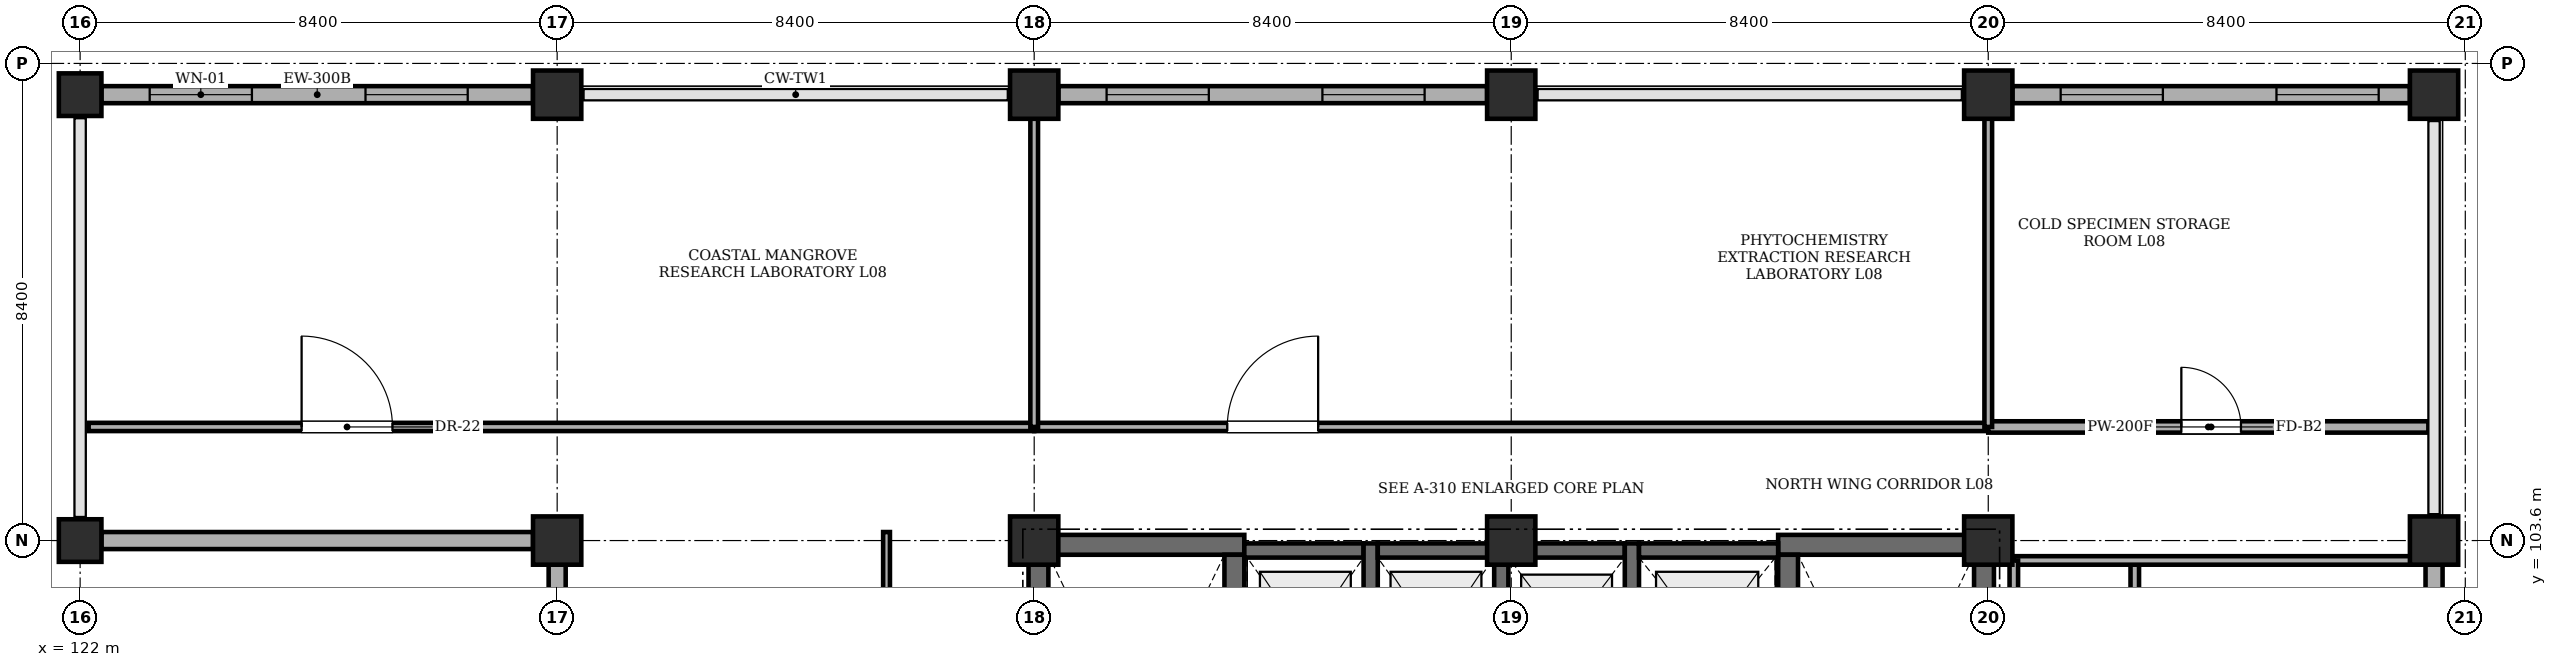
"""IFC4 building model, lengths in metres.
Left out: names, types, materials, properties, quantities, classifications, styles, units other than length and angle.
Written with IfcOpenShell. Run it as: python <this file> out.ifc"""

import sys

from ifc_helpers import new_model, si_unit, direction, frame, frame_2d, origin, origin_2d, place, context, subcontext, project, spatial, rectangle, extrude, element, fill, save


model = new_model("IFC4")
c1 = context("Model", 3, precision=1e-05, world=origin(), true_north=direction((0.0, 1.0)))
c2 = subcontext(c1, "Body", "Model", "MODEL_VIEW")
j1 = project(units=[si_unit("LENGTHUNIT", "METRE"), si_unit("PLANEANGLEUNIT", "RADIAN")], contexts=[c1])
p1 = place(None, origin())
s1 = spatial("IfcSite", under=j1, at=p1, CompositionType="ELEMENT")
p2 = place(p1, origin())
s2 = spatial("IfcBuilding", under=s1, at=p2, CompositionType="ELEMENT")
p3 = place(p2, frame((0.0, 0.0, 31.8)))
s3 = spatial("IfcBuildingStorey", under=s2, at=p3, CompositionType="ELEMENT", Elevation=31.8)
for number, where, z_axis, x_axis in (
    (1, (122.0, 103.6, 0.0), (0.0, 0.0, 1.0), (1.0, 0.0, 0.0)),
    (2, (122.0, 111.45, 0.0), (0.0, 0.0, 1.0), (1.0, 0.0, 0.0)),
):
    element("IfcColumn", number, at=place(p3, frame(where, z_axis=z_axis, x_axis=x_axis)), inside=s3, PredefinedType="COLUMN", context=c2, shape_type="SweptSolid", body=[
        extrude(rectangle(XDim=0.75, YDim=0.75, at=origin_2d()), origin(), (0.0, 0.0, 1.0), 4.02),
    ])
for number, where, z_axis, x_axis in (
    (3, (130.4, 103.6, 0.0), (0.0, 0.0, 1.0), (1.0, 0.0, 0.0)),
    (4, (130.4, 111.45, 0.0), (0.0, 0.0, 1.0), (1.0, 0.0, 0.0)),
    (5, (138.8, 103.6, 0.0), (0.0, 0.0, 1.0), (1.0, 0.0, 0.0)),
    (6, (138.8, 111.45, 0.0), (0.0, 0.0, 1.0), (1.0, 0.0, 0.0)),
    (7, (147.2, 103.6, 0.0), (0.0, 0.0, 1.0), (1.0, 0.0, 0.0)),
    (8, (147.2, 111.45, 0.0), (0.0, 0.0, 1.0), (1.0, 0.0, 0.0)),
    (9, (155.6, 103.6, 0.0), (0.0, 0.0, 1.0), (1.0, 0.0, 0.0)),
    (10, (155.6, 111.45, 0.0), (0.0, 0.0, 1.0), (1.0, 0.0, 0.0)),
    (11, (163.45, 103.6, 0.0), (0.0, 0.0, 1.0), (1.0, 0.0, 0.0)),
    (12, (163.45, 111.45, 0.0), (0.0, 0.0, 1.0), (1.0, 0.0, 0.0)),
):
    element("IfcColumn", number, at=place(p3, frame(where, z_axis=z_axis, x_axis=x_axis)), inside=s3, PredefinedType="COLUMN", context=c2, shape_type="SweptSolid", body=[
        extrude(rectangle(XDim=0.85, YDim=0.85, at=origin_2d()), origin(), (0.0, 0.0, 1.0), 4.02),
    ])
p4 = place(p3, frame((138.7, 103.525, 0.0), z_axis=(0.0, 0.0, 1.0), x_axis=(1.0, 0.0, 0.0)))
e13 = element("IfcWall", 13, at=p4, inside=s3, PredefinedType="SHEAR", context=c2, shape_type="SweptSolid", body=[
    extrude(rectangle(XDim=3.8, YDim=0.35, at=frame_2d((1.9, 0.0))), origin(), (0.0, 0.0, 1.0), 4.02),
])
p5 = place(p3, frame((138.875, 95.45, 0.0), z_axis=(0.0, 0.0, 1.0), x_axis=(0.0, 1.0, 0.0)))
e14 = element("IfcWall", 14, at=p5, inside=s3, PredefinedType="SHEAR", context=c2, shape_type="SweptSolid", body=[
    extrude(rectangle(XDim=7.9, YDim=0.35, at=frame_2d((3.95, 0.0))), origin(), (0.0, 0.0, 1.0), 4.02),
])
p6 = place(p3, frame((142.325, 95.45, 0.0), z_axis=(0.0, 0.0, 1.0), x_axis=(0.0, 1.0, 0.0)))
e15 = element("IfcWall", 15, at=p6, inside=s3, PredefinedType="SHEAR", context=c2, shape_type="SweptSolid", body=[
    extrude(rectangle(XDim=7.9, YDim=0.35, at=frame_2d((3.95, 0.0))), origin(), (0.0, 0.0, 1.0), 4.02),
])
p7 = place(p6, frame((0.22, 0.0, 0.0)))
e16 = element("IfcOpeningElement", 16, at=p7, cuts=e15, PredefinedType="OPENING", context=c2, shape_type="SweptSolid", body=[
    extrude(rectangle(XDim=1.15, YDim=2.15, at=frame_2d((0.575, 1.075))), frame((0.0, 0.185, 0.0), z_axis=(0.0, -1.0, 0.0), x_axis=(1.0, 0.0, 0.0)), (0.0, 0.0, 1.0), 0.37),
])
p8 = place(p3, frame((151.9, 103.525, 0.0), z_axis=(0.0, 0.0, 1.0), x_axis=(1.0, 0.0, 0.0)))
e17 = element("IfcWall", 17, at=p8, inside=s3, PredefinedType="SHEAR", context=c2, shape_type="SweptSolid", body=[
    extrude(rectangle(XDim=3.8, YDim=0.35, at=frame_2d((1.9, 0.0))), origin(), (0.0, 0.0, 1.0), 4.02),
])
p9 = place(p3, frame((152.075, 95.45, 0.0), z_axis=(0.0, 0.0, 1.0), x_axis=(0.0, 1.0, 0.0)))
e18 = element("IfcWall", 18, at=p9, inside=s3, PredefinedType="SHEAR", context=c2, shape_type="SweptSolid", body=[
    extrude(rectangle(XDim=7.9, YDim=0.35, at=frame_2d((3.95, 0.0))), origin(), (0.0, 0.0, 1.0), 4.02),
])
p10 = place(p9, frame((0.35, 0.0, 0.0)))
e19 = element("IfcOpeningElement", 19, at=p10, cuts=e18, PredefinedType="OPENING", context=c2, shape_type="SweptSolid", body=[
    extrude(rectangle(XDim=1.15, YDim=2.15, at=frame_2d((0.575, 1.075))), frame((0.0, 0.185, 0.0), z_axis=(0.0, -1.0, 0.0), x_axis=(1.0, 0.0, 0.0)), (0.0, 0.0, 1.0), 0.37),
])
p11 = place(p3, frame((155.525, 95.45, 0.0), z_axis=(0.0, 0.0, 1.0), x_axis=(0.0, 1.0, 0.0)))
e20 = element("IfcWall", 20, at=p11, inside=s3, PredefinedType="SHEAR", context=c2, shape_type="SweptSolid", body=[
    extrude(rectangle(XDim=7.9, YDim=0.35, at=frame_2d((3.95, 0.0))), origin(), (0.0, 0.0, 1.0), 4.02),
])
p12 = place(p3, frame((142.5, 103.425, 0.0), z_axis=(0.0, 0.0, 1.0), x_axis=(1.0, 0.0, 0.0)))
e21 = element("IfcWall", 21, at=p12, inside=s3, PredefinedType="SHEAR", context=c2, shape_type="SweptSolid", body=[
    extrude(rectangle(XDim=2.1, YDim=0.25, at=frame_2d((1.05, 0.0))), origin(), (0.0, 0.0, 1.0), 4.02),
])
p13 = place(p3, frame((144.725, 100.15, 0.0), z_axis=(0.0, 0.0, 1.0), x_axis=(0.0, 1.0, 0.0)))
e22 = element("IfcWall", 22, at=p13, inside=s3, PredefinedType="SHEAR", context=c2, shape_type="SweptSolid", body=[
    extrude(rectangle(XDim=3.4, YDim=0.25, at=frame_2d((1.7, 0.0))), origin(), (0.0, 0.0, 1.0), 4.02),
])
p14 = place(p3, frame((144.85, 103.425, 0.0), z_axis=(0.0, 0.0, 1.0), x_axis=(1.0, 0.0, 0.0)))
e23 = element("IfcWall", 23, at=p14, inside=s3, PredefinedType="SHEAR", context=c2, shape_type="SweptSolid", body=[
    extrude(rectangle(XDim=2.05, YDim=0.25, at=frame_2d((1.025, 0.0))), origin(), (0.0, 0.0, 1.0), 4.02),
])
p15 = place(p3, frame((147.025, 100.15, 0.0), z_axis=(0.0, 0.0, 1.0), x_axis=(0.0, 1.0, 0.0)))
e24 = element("IfcWall", 24, at=p15, inside=s3, PredefinedType="SHEAR", context=c2, shape_type="SweptSolid", body=[
    extrude(rectangle(XDim=3.4, YDim=0.25, at=frame_2d((1.7, 0.0))), origin(), (0.0, 0.0, 1.0), 4.02),
])
p16 = place(p3, frame((147.15, 103.425, 0.0), z_axis=(0.0, 0.0, 1.0), x_axis=(1.0, 0.0, 0.0)))
e25 = element("IfcWall", 25, at=p16, inside=s3, PredefinedType="SHEAR", context=c2, shape_type="SweptSolid", body=[
    extrude(rectangle(XDim=2.05, YDim=0.25, at=frame_2d((1.025, 0.0))), origin(), (0.0, 0.0, 1.0), 4.02),
])
p17 = place(p3, frame((149.325, 100.35, 0.0), z_axis=(0.0, 0.0, 1.0), x_axis=(0.0, 1.0, 0.0)))
e26 = element("IfcWall", 26, at=p17, inside=s3, PredefinedType="SHEAR", context=c2, shape_type="SweptSolid", body=[
    extrude(rectangle(XDim=3.2, YDim=0.25, at=frame_2d((1.6, 0.0))), origin(), (0.0, 0.0, 1.0), 4.02),
])
p18 = place(p3, frame((149.45, 103.425, 0.0), z_axis=(0.0, 0.0, 1.0), x_axis=(1.0, 0.0, 0.0)))
e27 = element("IfcWall", 27, at=p18, inside=s3, PredefinedType="SHEAR", context=c2, shape_type="SweptSolid", body=[
    extrude(rectangle(XDim=2.45, YDim=0.25, at=frame_2d((1.225, 0.0))), origin(), (0.0, 0.0, 1.0), 4.02),
])
p19 = place(p3, frame((122.375, 111.45, 0.0), z_axis=(0.0, 0.0, 1.0), x_axis=(1.0, 0.0, 0.0)))
e28 = element("IfcWall", 28, at=p19, inside=s3, PredefinedType="STANDARD", context=c2, shape_type="SweptSolid", body=[
    extrude(rectangle(XDim=7.6, YDim=0.3, at=frame_2d((3.8, 0.0))), origin(), (0.0, 0.0, 1.0), 3.32),
])
p20 = place(p19, frame((0.85, 0.0, 0.9)))
e29 = element("IfcOpeningElement", 29, at=p20, cuts=e28, PredefinedType="OPENING", context=c2, shape_type="SweptSolid", body=[
    extrude(rectangle(XDim=1.8, YDim=2.1, at=frame_2d((0.9, 1.05))), frame((0.0, 0.16, 0.0), z_axis=(0.0, -1.0, 0.0), x_axis=(1.0, 0.0, 0.0)), (0.0, 0.0, 1.0), 0.32),
])
p21 = place(p19, frame((4.65, 0.0, 0.9)))
e30 = element("IfcOpeningElement", 30, at=p21, cuts=e28, PredefinedType="OPENING", context=c2, shape_type="SweptSolid", body=[
    extrude(rectangle(XDim=1.8, YDim=2.1, at=frame_2d((0.9, 1.05))), frame((0.0, 0.16, 0.0), z_axis=(0.0, -1.0, 0.0), x_axis=(1.0, 0.0, 0.0)), (0.0, 0.0, 1.0), 0.32),
])
p22 = place(p3, frame((139.225, 111.45, 0.0), z_axis=(0.0, 0.0, 1.0), x_axis=(1.0, 0.0, 0.0)))
e31 = element("IfcWall", 31, at=p22, inside=s3, PredefinedType="STANDARD", context=c2, shape_type="SweptSolid", body=[
    extrude(rectangle(XDim=7.55, YDim=0.3, at=frame_2d((3.775, 0.0))), origin(), (0.0, 0.0, 1.0), 3.32),
])
p23 = place(p22, frame((0.85, 0.0, 0.9)))
e32 = element("IfcOpeningElement", 32, at=p23, cuts=e31, PredefinedType="OPENING", context=c2, shape_type="SweptSolid", body=[
    extrude(rectangle(XDim=1.8, YDim=2.1, at=frame_2d((0.9, 1.05))), frame((0.0, 0.16, 0.0), z_axis=(0.0, -1.0, 0.0), x_axis=(1.0, 0.0, 0.0)), (0.0, 0.0, 1.0), 0.32),
])
p24 = place(p22, frame((4.65, 0.0, 0.9)))
e33 = element("IfcOpeningElement", 33, at=p24, cuts=e31, PredefinedType="OPENING", context=c2, shape_type="SweptSolid", body=[
    extrude(rectangle(XDim=1.8, YDim=2.1, at=frame_2d((0.9, 1.05))), frame((0.0, 0.16, 0.0), z_axis=(0.0, -1.0, 0.0), x_axis=(1.0, 0.0, 0.0)), (0.0, 0.0, 1.0), 0.32),
])
p25 = place(p3, frame((156.025, 111.45, 0.0), z_axis=(0.0, 0.0, 1.0), x_axis=(1.0, 0.0, 0.0)))
e34 = element("IfcWall", 34, at=p25, inside=s3, PredefinedType="STANDARD", context=c2, shape_type="SweptSolid", body=[
    extrude(rectangle(XDim=7.0, YDim=0.3, at=frame_2d((3.5, 0.0))), origin(), (0.0, 0.0, 1.0), 3.32),
])
p26 = place(p25, frame((0.85, 0.0, 0.9)))
e35 = element("IfcOpeningElement", 35, at=p26, cuts=e34, PredefinedType="OPENING", context=c2, shape_type="SweptSolid", body=[
    extrude(rectangle(XDim=1.8, YDim=2.1, at=frame_2d((0.9, 1.05))), frame((0.0, 0.16, 0.0), z_axis=(0.0, -1.0, 0.0), x_axis=(1.0, 0.0, 0.0)), (0.0, 0.0, 1.0), 0.32),
])
p27 = place(p25, frame((4.65, 0.0, 0.9)))
e36 = element("IfcOpeningElement", 36, at=p27, cuts=e34, PredefinedType="OPENING", context=c2, shape_type="SweptSolid", body=[
    extrude(rectangle(XDim=1.8, YDim=2.1, at=frame_2d((0.9, 1.05))), frame((0.0, 0.16, 0.0), z_axis=(0.0, -1.0, 0.0), x_axis=(1.0, 0.0, 0.0)), (0.0, 0.0, 1.0), 0.32),
])
p28 = place(p3, frame((163.45, 103.175, 0.0), z_axis=(0.0, 0.0, 1.0), x_axis=(0.0, -1.0, 0.0)))
e37 = element("IfcWall", 37, at=p28, inside=s3, PredefinedType="STANDARD", context=c2, shape_type="SweptSolid", body=[
    extrude(rectangle(XDim=7.55, YDim=0.3, at=frame_2d((3.775, 0.0))), origin(), (0.0, 0.0, 1.0), 3.32),
])
p29 = place(p28, frame((1.15, 0.0, 1.1)))
e38 = element("IfcOpeningElement", 38, at=p29, cuts=e37, PredefinedType="OPENING", context=c2, shape_type="SweptSolid", body=[
    extrude(rectangle(XDim=1.4, YDim=1.4, at=frame_2d((0.7, 0.7))), frame((0.0, 0.16, 0.0), z_axis=(0.0, -1.0, 0.0), x_axis=(1.0, 0.0, 0.0)), (0.0, 0.0, 1.0), 0.32),
])
p30 = place(p3, frame((130.4, 95.625, 0.0), z_axis=(0.0, 0.0, 1.0), x_axis=(0.0, 1.0, 0.0)))
e39 = element("IfcWall", 39, at=p30, inside=s3, PredefinedType="STANDARD", context=c2, shape_type="SweptSolid", body=[
    extrude(rectangle(XDim=7.55, YDim=0.3, at=frame_2d((3.775, 0.0))), origin(), (0.0, 0.0, 1.0), 3.32),
])
p31 = place(p30, frame((2.4, 0.0, 1.0)))
e40 = element("IfcOpeningElement", 40, at=p31, cuts=e39, PredefinedType="OPENING", context=c2, shape_type="SweptSolid", body=[
    extrude(rectangle(XDim=1.8, YDim=1.8, at=frame_2d((0.9, 0.9))), frame((0.0, 0.16, 0.0), z_axis=(0.0, -1.0, 0.0), x_axis=(1.0, 0.0, 0.0)), (0.0, 0.0, 1.0), 0.32),
])
p32 = place(p3, frame((129.975, 103.6, 0.0), z_axis=(0.0, 0.0, 1.0), x_axis=(-1.0, 0.0, 0.0)))
e41 = element("IfcWall", 41, at=p32, inside=s3, PredefinedType="STANDARD", context=c2, shape_type="SweptSolid", body=[
    extrude(rectangle(XDim=7.6, YDim=0.3, at=frame_2d((3.8, 0.0))), origin(), (0.0, 0.0, 1.0), 3.32),
])
p33 = place(p3, frame((158.18, 94.68, 0.0), z_axis=(0.0, 0.0, 1.0), x_axis=(0.0, 1.0, 0.0)))
e42 = element("IfcWall", 42, at=p33, inside=s3, PredefinedType="PARTITIONING", context=c2, shape_type="SweptSolid", body=[
    extrude(rectangle(XDim=8.57, YDim=0.15, at=frame_2d((4.285, 0.0))), origin(), (0.0, 0.0, 1.0), 4.02),
])
p34 = place(p33, frame((0.8, 0.0, 0.0)))
e43 = element("IfcOpeningElement", 43, at=p34, cuts=e42, PredefinedType="OPENING", context=c2, shape_type="SweptSolid", body=[
    extrude(rectangle(XDim=1.0, YDim=2.12, at=frame_2d((0.5, 1.06))), frame((0.0, 0.085, 0.0), z_axis=(0.0, -1.0, 0.0), x_axis=(1.0, 0.0, 0.0)), (0.0, 0.0, 1.0), 0.17),
])
p35 = place(p33, frame((3.5, 0.0, 0.0)))
e44 = element("IfcOpeningElement", 44, at=p35, cuts=e42, PredefinedType="OPENING", context=c2, shape_type="SweptSolid", body=[
    extrude(rectangle(XDim=0.92, YDim=2.1, at=frame_2d((0.46, 1.05))), frame((0.0, 0.085, 0.0), z_axis=(0.0, -1.0, 0.0), x_axis=(1.0, 0.0, 0.0)), (0.0, 0.0, 1.0), 0.17),
])
p36 = place(p33, frame((6.4, 0.0, 0.0)))
e45 = element("IfcOpeningElement", 45, at=p36, cuts=e42, PredefinedType="OPENING", context=c2, shape_type="SweptSolid", body=[
    extrude(rectangle(XDim=0.92, YDim=2.1, at=frame_2d((0.46, 1.05))), frame((0.0, 0.085, 0.0), z_axis=(0.0, -1.0, 0.0), x_axis=(1.0, 0.0, 0.0)), (0.0, 0.0, 1.0), 0.17),
])
p37 = place(p3, frame((156.05, 103.25, 0.0), z_axis=(0.0, 0.0, 1.0), x_axis=(1.0, 0.0, 0.0)))
e46 = element("IfcWall", 46, at=p37, inside=s3, PredefinedType="PARTITIONING", context=c2, shape_type="SweptSolid", body=[
    extrude(rectangle(XDim=7.15, YDim=0.15, at=frame_2d((3.575, 0.0))), origin(), (0.0, 0.0, 1.0), 4.02),
])
p38 = place(p3, frame((156.05, 94.68, 0.0), z_axis=(0.0, 0.0, 1.0), x_axis=(0.0, 1.0, 0.0)))
e47 = element("IfcWall", 47, at=p38, inside=s3, PredefinedType="PARTITIONING", context=c2, shape_type="SweptSolid", body=[
    extrude(rectangle(XDim=8.57, YDim=0.15, at=frame_2d((4.285, 0.0))), origin(), (0.0, 0.0, 1.0), 4.02),
])
p39 = place(p3, frame((136.2, 94.68, 0.0), z_axis=(0.0, 0.0, 1.0), x_axis=(0.0, 1.0, 0.0)))
e48 = element("IfcWall", 48, at=p39, inside=s3, PredefinedType="PARTITIONING", context=c2, shape_type="SweptSolid", body=[
    extrude(rectangle(XDim=9.07, YDim=0.12, at=frame_2d((4.535, 0.0))), origin(), (0.0, 0.0, 1.0), 4.02),
])
p40 = place(p3, frame((122.15, 105.6, 0.0), z_axis=(0.0, 0.0, 1.0), x_axis=(1.0, 0.0, 0.0)))
e49 = element("IfcWall", 49, at=p40, inside=s3, PredefinedType="PARTITIONING", context=c2, shape_type="SweptSolid", body=[
    extrude(rectangle(XDim=16.65, YDim=0.145, at=frame_2d((8.325, 0.0))), origin(), (0.0, 0.0, 1.0), 4.02),
])
p41 = place(p40, frame((3.75, 0.0, 0.0)))
e50 = element("IfcOpeningElement", 50, at=p41, cuts=e49, PredefinedType="OPENING", context=c2, shape_type="SweptSolid", body=[
    extrude(rectangle(XDim=1.6, YDim=2.24, at=frame_2d((0.8, 1.12))), frame((0.0, 0.083, 0.0), z_axis=(0.0, -1.0, 0.0), x_axis=(1.0, 0.0, 0.0)), (0.0, 0.0, 1.0), 0.165),
])
p42 = place(p3, frame((138.8, 105.6, 0.0), z_axis=(0.0, 0.0, 1.0), x_axis=(1.0, 0.0, 0.0)))
e51 = element("IfcWall", 51, at=p42, inside=s3, PredefinedType="PARTITIONING", context=c2, shape_type="SweptSolid", body=[
    extrude(rectangle(XDim=16.8, YDim=0.145, at=frame_2d((8.4, 0.0))), origin(), (0.0, 0.0, 1.0), 4.02),
])
p43 = place(p42, frame((3.4, 0.0, 0.0)))
e52 = element("IfcOpeningElement", 52, at=p43, cuts=e51, PredefinedType="OPENING", context=c2, shape_type="SweptSolid", body=[
    extrude(rectangle(XDim=1.6, YDim=2.24, at=frame_2d((0.8, 1.12))), frame((0.0, 0.083, 0.0), z_axis=(0.0, -1.0, 0.0), x_axis=(1.0, 0.0, 0.0)), (0.0, 0.0, 1.0), 0.165),
])
p44 = place(p3, frame((138.8, 105.6, 0.0), z_axis=(0.0, 0.0, 1.0), x_axis=(0.0, 1.0, 0.0)))
e53 = element("IfcWall", 53, at=p44, inside=s3, PredefinedType="PARTITIONING", context=c2, shape_type="SweptSolid", body=[
    extrude(rectangle(XDim=5.75, YDim=0.135, at=frame_2d((2.875, 0.0))), origin(), (0.0, 0.0, 1.0), 3.32),
])
p45 = place(p3, frame((155.6, 105.6, 0.0), z_axis=(0.0, 0.0, 1.0), x_axis=(1.0, 0.0, 0.0)))
e54 = element("IfcWall", 54, at=p45, inside=s3, PredefinedType="SOLIDWALL", context=c2, shape_type="SweptSolid", body=[
    extrude(rectangle(XDim=7.75, YDim=0.2, at=frame_2d((3.875, 0.0))), origin(), (0.0, 0.0, 1.0), 4.02),
])
p46 = place(p45, frame((3.4, 0.0, 0.0)))
e55 = element("IfcOpeningElement", 55, at=p46, cuts=e54, PredefinedType="OPENING", context=c2, shape_type="SweptSolid", body=[
    extrude(rectangle(XDim=1.05, YDim=2.15, at=frame_2d((0.525, 1.075))), frame((0.0, 0.11, 0.0), z_axis=(0.0, -1.0, 0.0), x_axis=(1.0, 0.0, 0.0)), (0.0, 0.0, 1.0), 0.22),
])
p47 = place(p3, frame((155.6, 105.6, 0.0), z_axis=(0.0, 0.0, 1.0), x_axis=(0.0, 1.0, 0.0)))
e56 = element("IfcWall", 56, at=p47, inside=s3, PredefinedType="PARTITIONING", context=c2, shape_type="SweptSolid", body=[
    extrude(rectangle(XDim=5.75, YDim=0.135, at=frame_2d((2.875, 0.0))), origin(), (0.0, 0.0, 1.0), 3.32),
])
p48 = place(p20, origin())
e57 = element("IfcWindow", 57, at=p48, inside=s3, PartitioningType="DOUBLE_PANEL_VERTICAL", PredefinedType="WINDOW", context=c2, shape_type="SweptSolid", body=[
    extrude(rectangle(XDim=1.8, YDim=2.1, at=frame_2d((0.9, 1.05))), frame((0.0, 0.03, 0.0), z_axis=(0.0, -1.0, 0.0), x_axis=(1.0, 0.0, 0.0)), (0.0, 0.0, 1.0), 0.06),
])
fill(e29, e57)
p49 = place(p21, origin())
e58 = element("IfcWindow", 58, at=p49, inside=s3, PartitioningType="DOUBLE_PANEL_VERTICAL", PredefinedType="WINDOW", context=c2, shape_type="SweptSolid", body=[
    extrude(rectangle(XDim=1.8, YDim=2.1, at=frame_2d((0.9, 1.05))), frame((0.0, 0.03, 0.0), z_axis=(0.0, -1.0, 0.0), x_axis=(1.0, 0.0, 0.0)), (0.0, 0.0, 1.0), 0.06),
])
fill(e30, e58)
p50 = place(p23, origin())
e59 = element("IfcWindow", 59, at=p50, inside=s3, PartitioningType="DOUBLE_PANEL_VERTICAL", PredefinedType="WINDOW", context=c2, shape_type="SweptSolid", body=[
    extrude(rectangle(XDim=1.8, YDim=2.1, at=frame_2d((0.9, 1.05))), frame((0.0, 0.03, 0.0), z_axis=(0.0, -1.0, 0.0), x_axis=(1.0, 0.0, 0.0)), (0.0, 0.0, 1.0), 0.06),
])
fill(e32, e59)
p51 = place(p24, origin())
e60 = element("IfcWindow", 60, at=p51, inside=s3, PartitioningType="DOUBLE_PANEL_VERTICAL", PredefinedType="WINDOW", context=c2, shape_type="SweptSolid", body=[
    extrude(rectangle(XDim=1.8, YDim=2.1, at=frame_2d((0.9, 1.05))), frame((0.0, 0.03, 0.0), z_axis=(0.0, -1.0, 0.0), x_axis=(1.0, 0.0, 0.0)), (0.0, 0.0, 1.0), 0.06),
])
fill(e33, e60)
p52 = place(p26, origin())
e61 = element("IfcWindow", 61, at=p52, inside=s3, PartitioningType="DOUBLE_PANEL_VERTICAL", PredefinedType="WINDOW", context=c2, shape_type="SweptSolid", body=[
    extrude(rectangle(XDim=1.8, YDim=2.1, at=frame_2d((0.9, 1.05))), frame((0.0, 0.03, 0.0), z_axis=(0.0, -1.0, 0.0), x_axis=(1.0, 0.0, 0.0)), (0.0, 0.0, 1.0), 0.06),
])
fill(e35, e61)
p53 = place(p27, origin())
e62 = element("IfcWindow", 62, at=p53, inside=s3, PartitioningType="DOUBLE_PANEL_VERTICAL", PredefinedType="WINDOW", context=c2, shape_type="SweptSolid", body=[
    extrude(rectangle(XDim=1.8, YDim=2.1, at=frame_2d((0.9, 1.05))), frame((0.0, 0.03, 0.0), z_axis=(0.0, -1.0, 0.0), x_axis=(1.0, 0.0, 0.0)), (0.0, 0.0, 1.0), 0.06),
])
fill(e36, e62)
p54 = place(p41, origin())
e63 = element("IfcDoor", 63, at=p54, inside=s3, OperationType="SINGLE_SWING_LEFT", PredefinedType="DOOR", context=c2, shape_type="SweptSolid", body=[
    extrude(rectangle(XDim=1.6, YDim=2.24, at=frame_2d((0.8, 1.12))), frame((0.0, 0.025, 0.0), z_axis=(0.0, -1.0, 0.0), x_axis=(1.0, 0.0, 0.0)), (0.0, 0.0, 1.0), 0.05),
])
fill(e50, e63)
p55 = place(p43, origin())
e64 = element("IfcDoor", 64, at=p55, inside=s3, OperationType="SINGLE_SWING_RIGHT", PredefinedType="DOOR", context=c2, shape_type="SweptSolid", body=[
    extrude(rectangle(XDim=1.6, YDim=2.24, at=frame_2d((0.8, 1.12))), frame((0.0, 0.025, 0.0), z_axis=(0.0, -1.0, 0.0), x_axis=(1.0, 0.0, 0.0)), (0.0, 0.0, 1.0), 0.05),
])
fill(e52, e64)
p56 = place(p46, origin())
e65 = element("IfcDoor", 65, at=p56, inside=s3, OperationType="SINGLE_SWING_LEFT", PredefinedType="DOOR", context=c2, shape_type="SweptSolid", body=[
    extrude(rectangle(XDim=1.05, YDim=2.15, at=frame_2d((0.525, 1.075))), frame((0.0, 0.025, 0.0), z_axis=(0.0, -1.0, 0.0), x_axis=(1.0, 0.0, 0.0)), (0.0, 0.0, 1.0), 0.05),
])
fill(e55, e65)
save(model, sys.argv[1])
